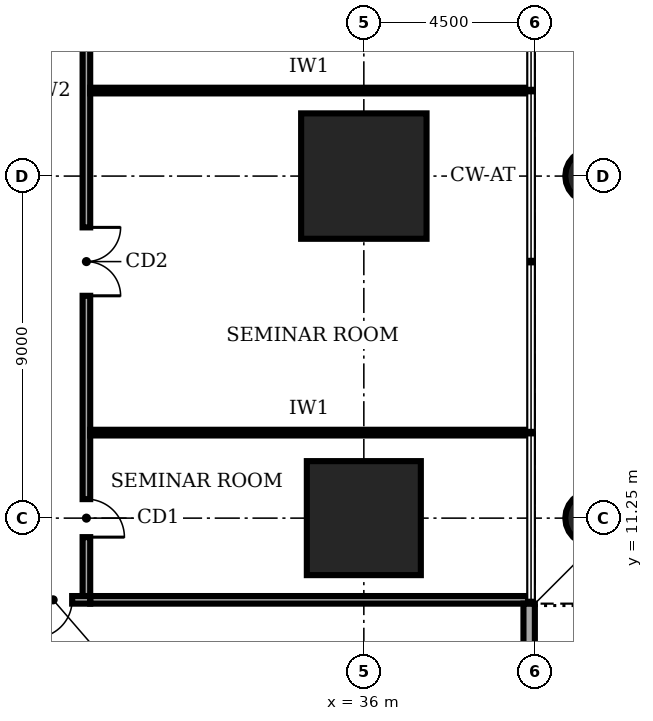
"""IFC4 building model, lengths in metres.
Left out: names, types, materials, properties, quantities, classifications, styles, units other than length and angle.
Written with IfcOpenShell. Run it as: python <this file> out.ifc"""

import sys

from ifc_helpers import new_model, si_unit, direction, frame, frame_2d, origin, origin_2d, place, context, subcontext, project, spatial, rectangle, circle, extrude, element, fill, save


model = new_model("IFC4")
c1 = context("Model", 3, precision=1e-05, world=origin(), true_north=direction((0.0, 1.0)))
c2 = subcontext(c1, "Body", "Model", "MODEL_VIEW")
j1 = project(units=[si_unit("LENGTHUNIT", "METRE"), si_unit("PLANEANGLEUNIT", "RADIAN")], contexts=[c1])
p1 = place(None, origin())
s1 = spatial("IfcSite", under=j1, at=p1, CompositionType="ELEMENT")
p2 = place(p1, origin())
s2 = spatial("IfcBuilding", under=s1, at=p2, CompositionType="ELEMENT")
p3 = place(p2, frame((0.0, 0.0, 6.0)))
s3 = spatial("IfcBuildingStorey", under=s2, at=p3, CompositionType="ELEMENT", Elevation=6.0)
p4 = place(p3, frame((36.0, 11.25, 0.0), z_axis=(0.0, 0.0, 1.0), x_axis=(1.0, 0.0, 0.0)))
e1 = element("IfcColumn", 1, at=p4, inside=s3, PredefinedType="COLUMN", context=c2, shape_type="SweptSolid", body=[
    extrude(rectangle(XDim=3.0, YDim=3.0, at=origin_2d()), origin(), (0.0, 0.0, 1.0), 5.0),
])
p5 = place(p3, frame((36.0, 20.25, 0.0), z_axis=(0.0, 0.0, 1.0), x_axis=(1.0, 0.0, 0.0)))
e2 = element("IfcColumn", 2, at=p5, inside=s3, PredefinedType="COLUMN", context=c2, shape_type="SweptSolid", body=[
    extrude(rectangle(XDim=3.3, YDim=3.3, at=origin_2d()), origin(), (0.0, 0.0, 1.0), 5.0),
])
for number, where, z_axis, x_axis in (
    (3, (42.0, 11.25, 0.0), (0.0, 0.0, 1.0), (1.0, 0.0, 0.0)),
    (4, (42.0, 20.25, 0.0), (0.0, 0.0, 1.0), (1.0, 0.0, 0.0)),
):
    element("IfcColumn", number, at=place(p3, frame(where, z_axis=z_axis, x_axis=x_axis)), inside=s3, PredefinedType="COLUMN", context=c2, shape_type="SweptSolid", body=[
        extrude(circle(Radius=0.7, at=origin_2d()), origin(), (0.0, 0.0, 1.0), 5.0),
    ])
p6 = place(p3, frame((11.9, 9.1, 0.0), z_axis=(0.0, 0.0, 1.0), x_axis=(1.0, 0.0, 0.0)))
e5 = element("IfcWall", 5, at=p6, inside=s3, PredefinedType="SOLIDWALL", context=c2, shape_type="SweptSolid", body=[
    extrude(rectangle(XDim=16.9, YDim=0.2, at=frame_2d((8.45, 0.0))), origin(), (0.0, 0.0, 1.0), 4.7),
])
p7 = place(p6, frame((0.1, 0.0, 0.0)))
e6 = element("IfcOpeningElement", 6, at=p7, cuts=e5, PredefinedType="OPENING", context=c2, shape_type="SweptSolid", body=[
    extrude(rectangle(XDim=1.2, YDim=2.4, at=frame_2d((0.6, 1.2))), frame((0.0, 0.11, 0.0), z_axis=(0.0, -1.0, 0.0), x_axis=(1.0, 0.0, 0.0)), (0.0, 0.0, 1.0), 0.22),
])
p8 = place(p6, frame((2.35, 0.0, 0.0)))
e7 = element("IfcOpeningElement", 7, at=p8, cuts=e5, PredefinedType="OPENING", context=c2, shape_type="SweptSolid", body=[
    extrude(rectangle(XDim=2.0, YDim=2.4, at=frame_2d((1.0, 1.2))), frame((0.0, 0.11, 0.0), z_axis=(0.0, -1.0, 0.0), x_axis=(1.0, 0.0, 0.0)), (0.0, 0.0, 1.0), 0.22),
])
p9 = place(p6, frame((12.35, 0.0, 0.0)))
e8 = element("IfcOpeningElement", 8, at=p9, cuts=e5, PredefinedType="OPENING", context=c2, shape_type="SweptSolid", body=[
    extrude(rectangle(XDim=2.0, YDim=2.4, at=frame_2d((1.0, 1.2))), frame((0.0, 0.11, 0.0), z_axis=(0.0, -1.0, 0.0), x_axis=(1.0, 0.0, 0.0)), (0.0, 0.0, 1.0), 0.22),
])
p10 = place(p6, frame((15.425, 0.0, 0.0)))
e9 = element("IfcOpeningElement", 9, at=p10, cuts=e5, PredefinedType="OPENING", context=c2, shape_type="SweptSolid", body=[
    extrude(rectangle(XDim=1.0, YDim=2.1, at=frame_2d((0.5, 1.05))), frame((0.0, 0.11, 0.0), z_axis=(0.0, -1.0, 0.0), x_axis=(1.0, 0.0, 0.0)), (0.0, 0.0, 1.0), 0.22),
])
p11 = place(p3, frame((28.7, 9.2, 0.0), z_axis=(0.0, 0.0, 1.0), x_axis=(0.0, 1.0, 0.0)))
e10 = element("IfcWall", 10, at=p11, inside=s3, PredefinedType="SOLIDWALL", context=c2, shape_type="SweptSolid", body=[
    extrude(rectangle(XDim=22.3, YDim=0.2, at=frame_2d((11.15, 0.0))), origin(), (0.0, 0.0, 1.0), 4.7),
])
p12 = place(p11, frame((1.55, 0.0, 0.0)))
e11 = element("IfcOpeningElement", 11, at=p12, cuts=e10, PredefinedType="OPENING", context=c2, shape_type="SweptSolid", body=[
    extrude(rectangle(XDim=1.0, YDim=2.1, at=frame_2d((0.5, 1.05))), frame((0.0, 0.11, 0.0), z_axis=(0.0, -1.0, 0.0), x_axis=(1.0, 0.0, 0.0)), (0.0, 0.0, 1.0), 0.22),
])
p13 = place(p11, frame((7.9, 0.0, 0.0)))
e12 = element("IfcOpeningElement", 12, at=p13, cuts=e10, PredefinedType="OPENING", context=c2, shape_type="SweptSolid", body=[
    extrude(rectangle(XDim=1.8, YDim=2.1, at=frame_2d((0.9, 1.05))), frame((0.0, 0.11, 0.0), z_axis=(0.0, -1.0, 0.0), x_axis=(1.0, 0.0, 0.0)), (0.0, 0.0, 1.0), 0.22),
])
p14 = place(p11, frame((16.9, 0.0, 0.0)))
e13 = element("IfcOpeningElement", 13, at=p14, cuts=e10, PredefinedType="OPENING", context=c2, shape_type="SweptSolid", body=[
    extrude(rectangle(XDim=1.8, YDim=2.1, at=frame_2d((0.9, 1.05))), frame((0.0, 0.11, 0.0), z_axis=(0.0, -1.0, 0.0), x_axis=(1.0, 0.0, 0.0)), (0.0, 0.0, 1.0), 0.22),
])
p15 = place(p3, frame((28.8, 9.1, 0.0), z_axis=(0.0, 0.0, 1.0), x_axis=(1.0, 0.0, 0.0)))
e14 = element("IfcWall", 14, at=p15, inside=s3, PredefinedType="SOLIDWALL", context=c2, shape_type="SweptSolid", body=[
    extrude(rectangle(XDim=11.52, YDim=0.2, at=frame_2d((5.76, 0.0))), origin(), (0.0, 0.0, 1.0), 4.7),
])
for number, where, z_axis, x_axis in (
    (15, (28.8, 13.5, 0.0), (0.0, 0.0, 1.0), (1.0, 0.0, 0.0)),
    (16, (28.8, 22.5, 0.0), (0.0, 0.0, 1.0), (1.0, 0.0, 0.0)),
):
    element("IfcWall", number, at=place(p3, frame(where, z_axis=z_axis, x_axis=x_axis)), inside=s3, PredefinedType="PARTITIONING", context=c2, shape_type="SweptSolid", body=[
        extrude(rectangle(XDim=11.52, YDim=0.15, at=frame_2d((5.76, 0.0))), origin(), (0.0, 0.0, 1.0), 4.7),
    ])
p16 = place(p3, frame((40.35, 4.97, 0.0), z_axis=(0.0, 0.0, 1.0), x_axis=(0.0, 1.0, 0.0)))
e17 = element("IfcWall", 17, at=p16, inside=s3, PredefinedType="SOLIDWALL", context=c2, shape_type="SweptSolid", body=[
    extrude(rectangle(XDim=4.03, YDim=0.3, at=frame_2d((2.015, 0.0))), origin(), (0.0, 0.0, 1.0), 4.7),
])
p17 = place(p10, frame((1.0, 0.0, 0.0), z_axis=(0.0, 0.0, 1.0), x_axis=(-1.0, 0.0, 0.0)))
e18 = element("IfcDoor", 18, at=p17, inside=s3, OperationType="SINGLE_SWING_RIGHT", PredefinedType="DOOR", context=c2, shape_type="SweptSolid", body=[
    extrude(rectangle(XDim=1.0, YDim=2.1, at=frame_2d((0.5, 1.05))), frame((0.0, 0.025, 0.0), z_axis=(0.0, -1.0, 0.0), x_axis=(1.0, 0.0, 0.0)), (0.0, 0.0, 1.0), 0.05),
])
fill(e9, e18)
p18 = place(p12, frame((1.0, 0.0, 0.0), z_axis=(0.0, 0.0, 1.0), x_axis=(-1.0, 0.0, 0.0)))
e19 = element("IfcDoor", 19, at=p18, inside=s3, OperationType="SINGLE_SWING_RIGHT", PredefinedType="DOOR", context=c2, shape_type="SweptSolid", body=[
    extrude(rectangle(XDim=1.0, YDim=2.1, at=frame_2d((0.5, 1.05))), frame((0.0, 0.025, 0.0), z_axis=(0.0, -1.0, 0.0), x_axis=(1.0, 0.0, 0.0)), (0.0, 0.0, 1.0), 0.05),
])
fill(e11, e19)
p19 = place(p13, frame((1.8, 0.0, 0.0), z_axis=(0.0, 0.0, 1.0), x_axis=(-1.0, 0.0, 0.0)))
e20 = element("IfcDoor", 20, at=p19, inside=s3, OperationType="DOUBLE_DOOR_SINGLE_SWING", PredefinedType="DOOR", context=c2, shape_type="SweptSolid", body=[
    extrude(rectangle(XDim=1.8, YDim=2.1, at=frame_2d((0.9, 1.05))), frame((0.0, 0.025, 0.0), z_axis=(0.0, -1.0, 0.0), x_axis=(1.0, 0.0, 0.0)), (0.0, 0.0, 1.0), 0.05),
])
fill(e12, e20)
save(model, sys.argv[1])
